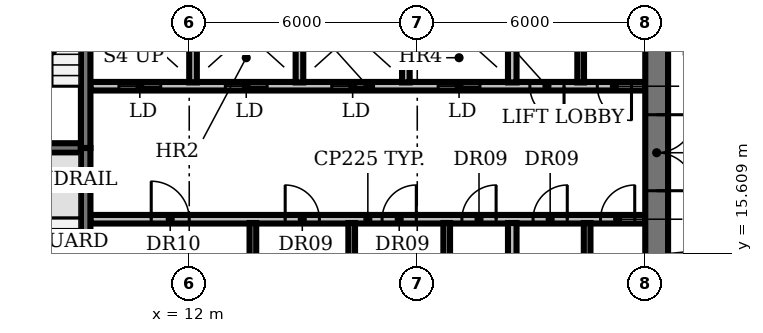
"""IFC4 building model, lengths in metres.
Left out: names, types, materials, properties, quantities, classifications, styles, units other than length and angle.
Written with IfcOpenShell. Run it as: python <this file> out.ifc"""

import sys

from ifc_helpers import new_model, si_unit, direction, frame, frame_2d, origin, place, context, subcontext, project, spatial, rectangle, extrude, element, fill, save


model = new_model("IFC4")
c1 = context("Model", 3, precision=1e-05, world=origin(), true_north=direction((0.0, 1.0)))
c2 = subcontext(c1, "Body", "Model", "MODEL_VIEW")
j1 = project(units=[si_unit("LENGTHUNIT", "METRE"), si_unit("PLANEANGLEUNIT", "RADIAN")], contexts=[c1])
p1 = place(None, origin())
s1 = spatial("IfcSite", under=j1, at=p1, CompositionType="ELEMENT")
p2 = place(p1, origin())
s2 = spatial("IfcBuilding", under=s1, at=p2, CompositionType="ELEMENT")
p3 = place(p2, frame((0.0, 0.0, 163.4)))
s3 = spatial("IfcBuildingStorey", under=s2, at=p3, CompositionType="ELEMENT", Elevation=163.4)
p4 = place(p3, frame((9.4, 16.5, 0.0), z_axis=(0.0, 0.0, 1.0), x_axis=(1.0, 0.0, 0.0)))
e1 = element("IfcWall", 1, at=p4, inside=s3, PredefinedType="PARTITIONING", context=c2, shape_type="SweptSolid", body=[
    extrude(rectangle(XDim=14.6, YDim=0.225, at=frame_2d((7.3, 0.0))), origin(), (0.0, 0.0, 1.0), 3.85),
])
p5 = place(p4, frame((1.6, 0.0, 0.0)))
e2 = element("IfcOpeningElement", 2, at=p5, cuts=e1, PredefinedType="OPENING", context=c2, shape_type="SweptSolid", body=[
    extrude(rectangle(XDim=1.0, YDim=2.1, at=frame_2d((0.5, 1.05))), frame((0.0, 0.123, 0.0), z_axis=(0.0, -1.0, 0.0), x_axis=(1.0, 0.0, 0.0)), (0.0, 0.0, 1.0), 0.245),
])
p6 = place(p4, frame((5.125, 0.0, 0.0)))
e3 = element("IfcOpeningElement", 3, at=p6, cuts=e1, PredefinedType="OPENING", context=c2, shape_type="SweptSolid", body=[
    extrude(rectangle(XDim=0.9, YDim=2.1, at=frame_2d((0.45, 1.05))), frame((0.0, 0.123, 0.0), z_axis=(0.0, -1.0, 0.0), x_axis=(1.0, 0.0, 0.0)), (0.0, 0.0, 1.0), 0.245),
])
p7 = place(p4, frame((7.675, 0.0, 0.0)))
e4 = element("IfcOpeningElement", 4, at=p7, cuts=e1, PredefinedType="OPENING", context=c2, shape_type="SweptSolid", body=[
    extrude(rectangle(XDim=0.9, YDim=2.1, at=frame_2d((0.45, 1.05))), frame((0.0, 0.123, 0.0), z_axis=(0.0, -1.0, 0.0), x_axis=(1.0, 0.0, 0.0)), (0.0, 0.0, 1.0), 0.245),
])
p8 = place(p4, frame((9.775, 0.0, 0.0)))
e5 = element("IfcOpeningElement", 5, at=p8, cuts=e1, PredefinedType="OPENING", context=c2, shape_type="SweptSolid", body=[
    extrude(rectangle(XDim=0.9, YDim=2.1, at=frame_2d((0.45, 1.05))), frame((0.0, 0.123, 0.0), z_axis=(0.0, -1.0, 0.0), x_axis=(1.0, 0.0, 0.0)), (0.0, 0.0, 1.0), 0.245),
])
p9 = place(p4, frame((11.647, 0.0, 0.0)))
e6 = element("IfcOpeningElement", 6, at=p9, cuts=e1, PredefinedType="OPENING", context=c2, shape_type="SweptSolid", body=[
    extrude(rectangle(XDim=0.9, YDim=2.1, at=frame_2d((0.45, 1.05))), frame((0.0, 0.123, 0.0), z_axis=(0.0, -1.0, 0.0), x_axis=(1.0, 0.0, 0.0)), (0.0, 0.0, 1.0), 0.245),
])
p10 = place(p4, frame((13.423, 0.0, 0.0)))
e7 = element("IfcOpeningElement", 7, at=p10, cuts=e1, PredefinedType="OPENING", context=c2, shape_type="SweptSolid", body=[
    extrude(rectangle(XDim=0.9, YDim=2.1, at=frame_2d((0.45, 1.05))), frame((0.0, 0.123, 0.0), z_axis=(0.0, -1.0, 0.0), x_axis=(1.0, 0.0, 0.0)), (0.0, 0.0, 1.0), 0.245),
])
p11 = place(p3, frame((6.0, 18.375, 0.0), z_axis=(0.0, 0.0, 1.0), x_axis=(1.0, 0.0, 0.0)))
e8 = element("IfcWall", 8, at=p11, inside=s3, PredefinedType="SHEAR", context=c2, shape_type="SweptSolid", body=[
    extrude(rectangle(XDim=3.15, YDim=0.25, at=frame_2d((1.575, 0.0))), origin(), (0.0, 0.0, 1.0), 3.85),
])
p12 = place(p3, frame((24.0, 20.0, 0.0), z_axis=(0.0, 0.0, 1.0), x_axis=(-1.0, 0.0, 0.0)))
e9 = element("IfcWall", 9, at=p12, inside=s3, PredefinedType="PARTITIONING", context=c2, shape_type="SweptSolid", body=[
    extrude(rectangle(XDim=14.6, YDim=0.225, at=frame_2d((7.3, 0.0))), origin(), (0.0, 0.0, 1.0), 3.85),
])
p13 = place(p12, frame((12.75, 0.0, 0.0)))
e10 = element("IfcOpeningElement", 10, at=p13, cuts=e9, PredefinedType="OPENING", context=c2, shape_type="SweptSolid", body=[
    extrude(rectangle(XDim=1.1, YDim=2.1, at=frame_2d((0.55, 1.05))), frame((0.0, 0.123, 0.0), z_axis=(0.0, -1.0, 0.0), x_axis=(1.0, 0.0, 0.0)), (0.0, 0.0, 1.0), 0.245),
])
p14 = place(p12, frame((9.95, 0.0, 0.0)))
e11 = element("IfcOpeningElement", 11, at=p14, cuts=e9, PredefinedType="OPENING", context=c2, shape_type="SweptSolid", body=[
    extrude(rectangle(XDim=1.1, YDim=2.1, at=frame_2d((0.55, 1.05))), frame((0.0, 0.123, 0.0), z_axis=(0.0, -1.0, 0.0), x_axis=(1.0, 0.0, 0.0)), (0.0, 0.0, 1.0), 0.245),
])
p15 = place(p12, frame((7.15, 0.0, 0.0)))
e12 = element("IfcOpeningElement", 12, at=p15, cuts=e9, PredefinedType="OPENING", context=c2, shape_type="SweptSolid", body=[
    extrude(rectangle(XDim=1.1, YDim=2.1, at=frame_2d((0.55, 1.05))), frame((0.0, 0.123, 0.0), z_axis=(0.0, -1.0, 0.0), x_axis=(1.0, 0.0, 0.0)), (0.0, 0.0, 1.0), 0.245),
])
p16 = place(p12, frame((4.35, 0.0, 0.0)))
e13 = element("IfcOpeningElement", 13, at=p16, cuts=e9, PredefinedType="OPENING", context=c2, shape_type="SweptSolid", body=[
    extrude(rectangle(XDim=1.1, YDim=2.1, at=frame_2d((0.55, 1.05))), frame((0.0, 0.123, 0.0), z_axis=(0.0, -1.0, 0.0), x_axis=(1.0, 0.0, 0.0)), (0.0, 0.0, 1.0), 0.245),
])
p17 = place(p12, frame((2.137, 0.0, 0.0)))
e14 = element("IfcOpeningElement", 14, at=p17, cuts=e9, PredefinedType="OPENING", context=c2, shape_type="SweptSolid", body=[
    extrude(rectangle(XDim=0.9, YDim=2.1, at=frame_2d((0.45, 1.05))), frame((0.0, 0.123, 0.0), z_axis=(0.0, -1.0, 0.0), x_axis=(1.0, 0.0, 0.0)), (0.0, 0.0, 1.0), 0.245),
])
p18 = place(p12, frame((0.363, 0.0, 0.0)))
e15 = element("IfcOpeningElement", 15, at=p18, cuts=e9, PredefinedType="OPENING", context=c2, shape_type="SweptSolid", body=[
    extrude(rectangle(XDim=0.9, YDim=2.1, at=frame_2d((0.45, 1.05))), frame((0.0, 0.123, 0.0), z_axis=(0.0, -1.0, 0.0), x_axis=(1.0, 0.0, 0.0)), (0.0, 0.0, 1.0), 0.245),
])
p19 = place(p3, frame((9.275, 18.375, 0.0), z_axis=(0.0, 0.0, 1.0), x_axis=(0.0, -1.0, 0.0)))
e16 = element("IfcWall", 16, at=p19, inside=s3, PredefinedType="SHEAR", context=c2, shape_type="SweptSolid", body=[
    extrude(rectangle(XDim=6.55, YDim=0.25, at=frame_2d((3.275, 0.0))), origin(), (0.0, 0.0, 1.0), 3.85),
])
p20 = place(p19, frame((5.075, 0.0, 0.0)))
e17 = element("IfcOpeningElement", 17, at=p20, cuts=e16, PredefinedType="OPENING", context=c2, shape_type="SweptSolid", body=[
    extrude(rectangle(XDim=1.0, YDim=2.1, at=frame_2d((0.5, 1.05))), frame((0.0, 0.135, 0.0), z_axis=(0.0, -1.0, 0.0), x_axis=(1.0, 0.0, 0.0)), (0.0, 0.0, 1.0), 0.27),
])
p21 = place(p3, frame((9.275, 18.375, 0.0), z_axis=(0.0, 0.0, 1.0), x_axis=(0.0, 1.0, 0.0)))
e18 = element("IfcWall", 18, at=p21, inside=s3, PredefinedType="SHEAR", context=c2, shape_type="SweptSolid", body=[
    extrude(rectangle(XDim=6.425, YDim=0.25, at=frame_2d((3.212, 0.0))), origin(), (0.0, 0.0, 1.0), 3.85),
])
p22 = place(p3, frame((12.1, 20.1, 0.0), z_axis=(0.0, 0.0, 1.0), x_axis=(0.0, 1.0, 0.0)))
e19 = element("IfcWall", 19, at=p22, inside=s3, PredefinedType="SOLIDWALL", context=c2, shape_type="SweptSolid", body=[
    extrude(rectangle(XDim=2.6, YDim=0.2, at=frame_2d((1.3, 0.0))), origin(), (0.0, 0.0, 1.0), 3.85),
])
p23 = place(p3, frame((13.675, 13.8, 0.0), z_axis=(0.0, 0.0, 1.0), x_axis=(0.0, 1.0, 0.0)))
e20 = element("IfcWall", 20, at=p23, inside=s3, PredefinedType="PARTITIONING", context=c2, shape_type="SweptSolid", body=[
    extrude(rectangle(XDim=2.6, YDim=0.175, at=frame_2d((1.3, 0.0))), origin(), (0.0, 0.0, 1.0), 3.85),
])
p24 = place(p3, frame((14.9, 20.1, 0.0), z_axis=(0.0, 0.0, 1.0), x_axis=(0.0, 1.0, 0.0)))
e21 = element("IfcWall", 21, at=p24, inside=s3, PredefinedType="SOLIDWALL", context=c2, shape_type="SweptSolid", body=[
    extrude(rectangle(XDim=2.6, YDim=0.2, at=frame_2d((1.3, 0.0))), origin(), (0.0, 0.0, 1.0), 3.85),
])
p25 = place(p3, frame((16.275, 13.8, 0.0), z_axis=(0.0, 0.0, 1.0), x_axis=(0.0, 1.0, 0.0)))
e22 = element("IfcWall", 22, at=p25, inside=s3, PredefinedType="PARTITIONING", context=c2, shape_type="SweptSolid", body=[
    extrude(rectangle(XDim=2.6, YDim=0.175, at=frame_2d((1.3, 0.0))), origin(), (0.0, 0.0, 1.0), 3.85),
])
p26 = place(p3, frame((17.7, 20.1, 0.0), z_axis=(0.0, 0.0, 1.0), x_axis=(0.0, 1.0, 0.0)))
e23 = element("IfcWall", 23, at=p26, inside=s3, PredefinedType="SOLIDWALL", context=c2, shape_type="SweptSolid", body=[
    extrude(rectangle(XDim=2.6, YDim=0.2, at=frame_2d((1.3, 0.0))), origin(), (0.0, 0.0, 1.0), 3.85),
])
p27 = place(p3, frame((18.775, 13.8, 0.0), z_axis=(0.0, 0.0, 1.0), x_axis=(0.0, 1.0, 0.0)))
e24 = element("IfcWall", 24, at=p27, inside=s3, PredefinedType="PARTITIONING", context=c2, shape_type="SweptSolid", body=[
    extrude(rectangle(XDim=2.6, YDim=0.175, at=frame_2d((1.3, 0.0))), origin(), (0.0, 0.0, 1.0), 3.85),
])
for number, where, z_axis, x_axis in (
    (25, (20.5, 13.8, 0.0), (0.0, 0.0, 1.0), (0.0, 1.0, 0.0)),
    (26, (20.5, 20.1, 0.0), (0.0, 0.0, 1.0), (0.0, 1.0, 0.0)),
):
    element("IfcWall", number, at=place(p3, frame(where, z_axis=z_axis, x_axis=x_axis)), inside=s3, PredefinedType="PARTITIONING", context=c2, shape_type="SweptSolid", body=[
        extrude(rectangle(XDim=2.6, YDim=0.225, at=frame_2d((1.3, 0.0))), origin(), (0.0, 0.0, 1.0), 3.85),
    ])
for number, where, z_axis, x_axis in (
    (27, (22.3, 20.1, 0.0), (0.0, 0.0, 1.0), (0.0, 1.0, 0.0)),
    (28, (22.47, 13.8, 0.0), (0.0, 0.0, 1.0), (0.0, 1.0, 0.0)),
):
    element("IfcWall", number, at=place(p3, frame(where, z_axis=z_axis, x_axis=x_axis)), inside=s3, PredefinedType="PARTITIONING", context=c2, shape_type="SweptSolid", body=[
        extrude(rectangle(XDim=2.6, YDim=0.175, at=frame_2d((1.3, 0.0))), origin(), (0.0, 0.0, 1.0), 3.85),
    ])
p28 = place(p3, frame((24.3, 25.555, 0.0), z_axis=(0.0, 0.0, 1.0), x_axis=(0.0, -1.0, 0.0)))
e29 = element("IfcWall", 29, at=p28, inside=s3, PredefinedType="SHEAR", context=c2, shape_type="SweptSolid", body=[
    extrude(rectangle(XDim=20.755, YDim=0.6, at=frame_2d((10.377, 0.0))), origin(), (0.0, 0.0, 1.0), 3.85),
])
p29 = place(p28, frame((18.405, 0.0, 0.0)))
e30 = element("IfcOpeningElement", 30, at=p29, cuts=e29, PredefinedType="OPENING", context=c2, shape_type="SweptSolid", body=[
    extrude(rectangle(XDim=1.5, YDim=2.1, at=frame_2d((0.75, 1.05))), frame((0.0, 0.31, 0.0), z_axis=(0.0, -1.0, 0.0), x_axis=(1.0, 0.0, 0.0)), (0.0, 0.0, 1.0), 0.62),
])
p30 = place(p28, frame((12.305, 0.0, 0.0)))
e31 = element("IfcOpeningElement", 31, at=p30, cuts=e29, PredefinedType="OPENING", context=c2, shape_type="SweptSolid", body=[
    extrude(rectangle(XDim=0.9, YDim=2.1, at=frame_2d((0.45, 1.05))), frame((0.0, 0.31, 0.0), z_axis=(0.0, -1.0, 0.0), x_axis=(1.0, 0.0, 0.0)), (0.0, 0.0, 1.0), 0.62),
])
p31 = place(p28, frame((6.305, 0.0, 0.0)))
e32 = element("IfcOpeningElement", 32, at=p31, cuts=e29, PredefinedType="OPENING", context=c2, shape_type="SweptSolid", body=[
    extrude(rectangle(XDim=2.0, YDim=2.1, at=frame_2d((1.0, 1.05))), frame((0.0, 0.31, 0.0), z_axis=(0.0, -1.0, 0.0), x_axis=(1.0, 0.0, 0.0)), (0.0, 0.0, 1.0), 0.62),
])
p32 = place(p5, origin())
e33 = element("IfcDoor", 33, at=p32, inside=s3, OperationType="SINGLE_SWING_LEFT", PredefinedType="DOOR", context=c2, shape_type="SweptSolid", body=[
    extrude(rectangle(XDim=1.0, YDim=2.1, at=frame_2d((0.5, 1.05))), frame((0.0, 0.025, 0.0), z_axis=(0.0, -1.0, 0.0), x_axis=(1.0, 0.0, 0.0)), (0.0, 0.0, 1.0), 0.05),
])
fill(e2, e33)
p33 = place(p6, origin())
e34 = element("IfcDoor", 34, at=p33, inside=s3, OperationType="SINGLE_SWING_LEFT", PredefinedType="DOOR", context=c2, shape_type="SweptSolid", body=[
    extrude(rectangle(XDim=0.9, YDim=2.1, at=frame_2d((0.45, 1.05))), frame((0.0, 0.025, 0.0), z_axis=(0.0, -1.0, 0.0), x_axis=(1.0, 0.0, 0.0)), (0.0, 0.0, 1.0), 0.05),
])
fill(e3, e34)
p34 = place(p7, origin())
e35 = element("IfcDoor", 35, at=p34, inside=s3, OperationType="SINGLE_SWING_RIGHT", PredefinedType="DOOR", context=c2, shape_type="SweptSolid", body=[
    extrude(rectangle(XDim=0.9, YDim=2.1, at=frame_2d((0.45, 1.05))), frame((0.0, 0.025, 0.0), z_axis=(0.0, -1.0, 0.0), x_axis=(1.0, 0.0, 0.0)), (0.0, 0.0, 1.0), 0.05),
])
fill(e4, e35)
p35 = place(p8, origin())
e36 = element("IfcDoor", 36, at=p35, inside=s3, OperationType="SINGLE_SWING_RIGHT", PredefinedType="DOOR", context=c2, shape_type="SweptSolid", body=[
    extrude(rectangle(XDim=0.9, YDim=2.1, at=frame_2d((0.45, 1.05))), frame((0.0, 0.025, 0.0), z_axis=(0.0, -1.0, 0.0), x_axis=(1.0, 0.0, 0.0)), (0.0, 0.0, 1.0), 0.05),
])
fill(e5, e36)
p36 = place(p9, origin())
e37 = element("IfcDoor", 37, at=p36, inside=s3, OperationType="SINGLE_SWING_RIGHT", PredefinedType="DOOR", context=c2, shape_type="SweptSolid", body=[
    extrude(rectangle(XDim=0.9, YDim=2.1, at=frame_2d((0.45, 1.05))), frame((0.0, 0.025, 0.0), z_axis=(0.0, -1.0, 0.0), x_axis=(1.0, 0.0, 0.0)), (0.0, 0.0, 1.0), 0.05),
])
fill(e6, e37)
p37 = place(p10, origin())
e38 = element("IfcDoor", 38, at=p37, inside=s3, OperationType="SINGLE_SWING_RIGHT", PredefinedType="DOOR", context=c2, shape_type="SweptSolid", body=[
    extrude(rectangle(XDim=0.9, YDim=2.1, at=frame_2d((0.45, 1.05))), frame((0.0, 0.025, 0.0), z_axis=(0.0, -1.0, 0.0), x_axis=(1.0, 0.0, 0.0)), (0.0, 0.0, 1.0), 0.05),
])
fill(e7, e38)
p38 = place(p13, origin())
e39 = element("IfcDoor", 39, at=p38, inside=s3, OperationType="DOUBLE_DOOR_SLIDING", PredefinedType="DOOR", context=c2, shape_type="SweptSolid", body=[
    extrude(rectangle(XDim=1.1, YDim=2.1, at=frame_2d((0.55, 1.05))), frame((0.0, 0.025, 0.0), z_axis=(0.0, -1.0, 0.0), x_axis=(1.0, 0.0, 0.0)), (0.0, 0.0, 1.0), 0.05),
])
fill(e10, e39)
p39 = place(p14, origin())
e40 = element("IfcDoor", 40, at=p39, inside=s3, OperationType="DOUBLE_DOOR_SLIDING", PredefinedType="DOOR", context=c2, shape_type="SweptSolid", body=[
    extrude(rectangle(XDim=1.1, YDim=2.1, at=frame_2d((0.55, 1.05))), frame((0.0, 0.025, 0.0), z_axis=(0.0, -1.0, 0.0), x_axis=(1.0, 0.0, 0.0)), (0.0, 0.0, 1.0), 0.05),
])
fill(e11, e40)
p40 = place(p15, origin())
e41 = element("IfcDoor", 41, at=p40, inside=s3, OperationType="DOUBLE_DOOR_SLIDING", PredefinedType="DOOR", context=c2, shape_type="SweptSolid", body=[
    extrude(rectangle(XDim=1.1, YDim=2.1, at=frame_2d((0.55, 1.05))), frame((0.0, 0.025, 0.0), z_axis=(0.0, -1.0, 0.0), x_axis=(1.0, 0.0, 0.0)), (0.0, 0.0, 1.0), 0.05),
])
fill(e12, e41)
p41 = place(p16, origin())
e42 = element("IfcDoor", 42, at=p41, inside=s3, OperationType="DOUBLE_DOOR_SLIDING", PredefinedType="DOOR", context=c2, shape_type="SweptSolid", body=[
    extrude(rectangle(XDim=1.1, YDim=2.1, at=frame_2d((0.55, 1.05))), frame((0.0, 0.025, 0.0), z_axis=(0.0, -1.0, 0.0), x_axis=(1.0, 0.0, 0.0)), (0.0, 0.0, 1.0), 0.05),
])
fill(e13, e42)
p42 = place(p17, origin())
e43 = element("IfcDoor", 43, at=p42, inside=s3, OperationType="SINGLE_SWING_LEFT", PredefinedType="DOOR", context=c2, shape_type="SweptSolid", body=[
    extrude(rectangle(XDim=0.9, YDim=2.1, at=frame_2d((0.45, 1.05))), frame((0.0, 0.025, 0.0), z_axis=(0.0, -1.0, 0.0), x_axis=(1.0, 0.0, 0.0)), (0.0, 0.0, 1.0), 0.05),
])
fill(e14, e43)
p43 = place(p18, origin())
e44 = element("IfcDoor", 44, at=p43, inside=s3, OperationType="SINGLE_SWING_LEFT", PredefinedType="DOOR", context=c2, shape_type="SweptSolid", body=[
    extrude(rectangle(XDim=0.9, YDim=2.1, at=frame_2d((0.45, 1.05))), frame((0.0, 0.025, 0.0), z_axis=(0.0, -1.0, 0.0), x_axis=(1.0, 0.0, 0.0)), (0.0, 0.0, 1.0), 0.05),
])
fill(e15, e44)
p44 = place(p31, origin())
e45 = element("IfcDoor", 45, at=p44, inside=s3, OperationType="DOUBLE_DOOR_SINGLE_SWING", PredefinedType="DOOR", context=c2, shape_type="SweptSolid", body=[
    extrude(rectangle(XDim=2.0, YDim=2.1, at=frame_2d((1.0, 1.05))), frame((0.0, 0.025, 0.0), z_axis=(0.0, -1.0, 0.0), x_axis=(1.0, 0.0, 0.0)), (0.0, 0.0, 1.0), 0.05),
])
fill(e32, e45)
save(model, sys.argv[1])
